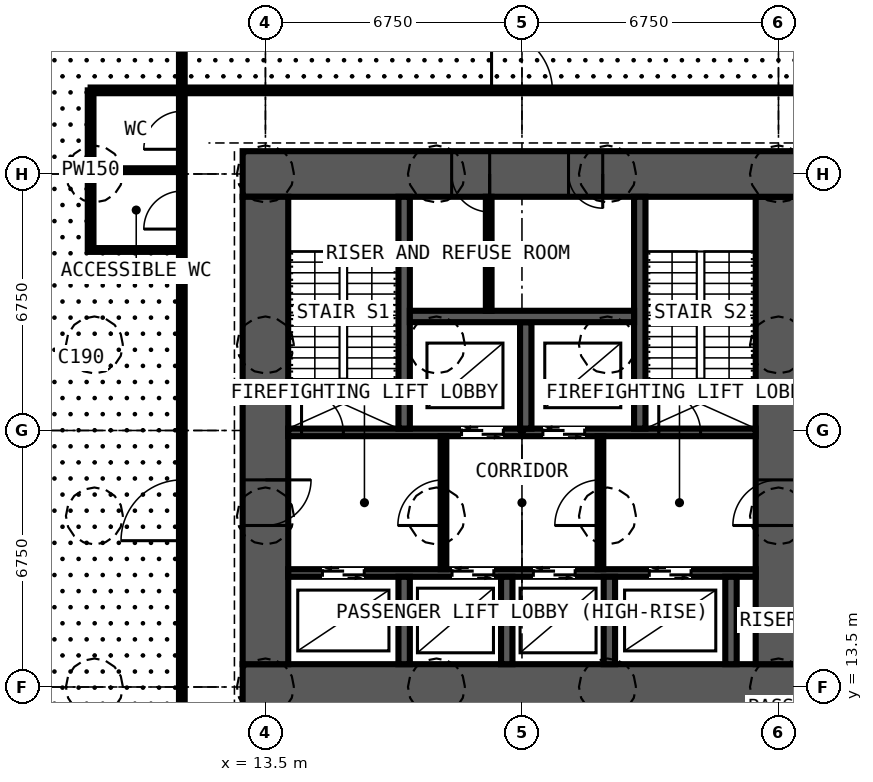
"""IFC4 building model, lengths in metres.
Left out: names, types, materials, properties, quantities, classifications, styles, units other than length and angle.
Written with IfcOpenShell. Run it as: python <this file> out.ifc"""

import sys

from ifc_helpers import new_model, si_unit, direction, frame, frame_2d, origin, place, context, subcontext, project, spatial, rectangle, extrude, element, fill, save


model = new_model("IFC4")
c1 = context("Model", 3, precision=1e-05, world=origin(), true_north=direction((0.0, 1.0)))
c2 = subcontext(c1, "Body", "Model", "MODEL_VIEW")
j1 = project(units=[si_unit("LENGTHUNIT", "METRE"), si_unit("PLANEANGLEUNIT", "RADIAN")], contexts=[c1])
p1 = place(None, origin())
s1 = spatial("IfcSite", under=j1, at=p1, CompositionType="ELEMENT")
p2 = place(p1, origin())
s2 = spatial("IfcBuilding", under=s1, at=p2, CompositionType="ELEMENT")
p3 = place(p2, origin())
s3 = spatial("IfcBuildingStorey", under=s2, at=p3, CompositionType="ELEMENT", Elevation=0.0)
p4 = place(p3, frame((12.9, 13.5, 0.0), z_axis=(0.0, 0.0, 1.0), x_axis=(1.0, 0.0, 0.0)))
e1 = element("IfcWall", 1, at=p4, inside=s3, PredefinedType="SHEAR", context=c2, shape_type="SweptSolid", body=[
    extrude(rectangle(XDim=14.7, YDim=1.2, at=frame_2d((7.35, 0.0))), origin(), (0.0, 0.0, 1.0), 4.5),
])
p5 = place(p3, frame((27.0, 14.1, 0.0), z_axis=(0.0, 0.0, 1.0), x_axis=(0.0, 1.0, 0.0)))
e2 = element("IfcWall", 2, at=p5, inside=s3, PredefinedType="SHEAR", context=c2, shape_type="SweptSolid", body=[
    extrude(rectangle(XDim=12.3, YDim=1.2, at=frame_2d((6.15, 0.0))), origin(), (0.0, 0.0, 1.0), 4.5),
])
p6 = place(p5, frame((3.65, 0.0, 0.0)))
e3 = element("IfcOpeningElement", 3, at=p6, cuts=e2, PredefinedType="OPENING", context=c2, shape_type="SweptSolid", body=[
    extrude(rectangle(XDim=1.2, YDim=2.2, at=frame_2d((0.6, 1.1))), frame((0.0, 0.61, 0.0), z_axis=(0.0, -1.0, 0.0), x_axis=(1.0, 0.0, 0.0)), (0.0, 0.0, 1.0), 1.22),
])
p7 = place(p3, frame((27.6, 27.0, 0.0), z_axis=(0.0, 0.0, 1.0), x_axis=(-1.0, 0.0, 0.0)))
e4 = element("IfcWall", 4, at=p7, inside=s3, PredefinedType="SHEAR", context=c2, shape_type="SweptSolid", body=[
    extrude(rectangle(XDim=14.7, YDim=1.2, at=frame_2d((7.35, 0.0))), origin(), (0.0, 0.0, 1.0), 4.5),
])
p8 = place(p7, frame((5.225, 0.0, 0.0)))
e5 = element("IfcOpeningElement", 5, at=p8, cuts=e4, PredefinedType="OPENING", context=c2, shape_type="SweptSolid", body=[
    extrude(rectangle(XDim=0.9, YDim=2.2, at=frame_2d((0.45, 1.1))), frame((0.0, 0.61, 0.0), z_axis=(0.0, -1.0, 0.0), x_axis=(1.0, 0.0, 0.0)), (0.0, 0.0, 1.0), 1.22),
])
p9 = place(p7, frame((8.2, 0.0, 0.0)))
e6 = element("IfcOpeningElement", 6, at=p9, cuts=e4, PredefinedType="OPENING", context=c2, shape_type="SweptSolid", body=[
    extrude(rectangle(XDim=1.0, YDim=2.2, at=frame_2d((0.5, 1.1))), frame((0.0, 0.61, 0.0), z_axis=(0.0, -1.0, 0.0), x_axis=(1.0, 0.0, 0.0)), (0.0, 0.0, 1.0), 1.22),
])
p10 = place(p3, frame((13.5, 26.4, 0.0), z_axis=(0.0, 0.0, 1.0), x_axis=(0.0, -1.0, 0.0)))
e7 = element("IfcWall", 7, at=p10, inside=s3, PredefinedType="SHEAR", context=c2, shape_type="SweptSolid", body=[
    extrude(rectangle(XDim=12.3, YDim=1.2, at=frame_2d((6.15, 0.0))), origin(), (0.0, 0.0, 1.0), 4.5),
])
p11 = place(p10, frame((7.45, 0.0, 0.0)))
e8 = element("IfcOpeningElement", 8, at=p11, cuts=e7, PredefinedType="OPENING", context=c2, shape_type="SweptSolid", body=[
    extrude(rectangle(XDim=1.2, YDim=2.2, at=frame_2d((0.6, 1.1))), frame((0.0, 0.61, 0.0), z_axis=(0.0, -1.0, 0.0), x_axis=(1.0, 0.0, 0.0)), (0.0, 0.0, 1.0), 1.22),
])
p12 = place(p3, frame((14.1, 16.5, 0.0), z_axis=(0.0, 0.0, 1.0), x_axis=(1.0, 0.0, 0.0)))
e9 = element("IfcWall", 9, at=p12, inside=s3, PredefinedType="SHEAR", context=c2, shape_type="SweptSolid", body=[
    extrude(rectangle(XDim=12.3, YDim=0.2, at=frame_2d((6.15, 0.0))), origin(), (0.0, 0.0, 1.0), 4.5),
])
p13 = place(p12, frame((0.9, 0.0, 0.0)))
e10 = element("IfcOpeningElement", 10, at=p13, cuts=e9, PredefinedType="OPENING", context=c2, shape_type="SweptSolid", body=[
    extrude(rectangle(XDim=1.1, YDim=2.2, at=frame_2d((0.55, 1.1))), frame((0.0, 0.11, 0.0), z_axis=(0.0, -1.0, 0.0), x_axis=(1.0, 0.0, 0.0)), (0.0, 0.0, 1.0), 0.22),
])
p14 = place(p12, frame((4.31, 0.0, 0.0)))
e11 = element("IfcOpeningElement", 11, at=p14, cuts=e9, PredefinedType="OPENING", context=c2, shape_type="SweptSolid", body=[
    extrude(rectangle(XDim=1.1, YDim=2.2, at=frame_2d((0.55, 1.1))), frame((0.0, 0.11, 0.0), z_axis=(0.0, -1.0, 0.0), x_axis=(1.0, 0.0, 0.0)), (0.0, 0.0, 1.0), 0.22),
])
p15 = place(p12, frame((6.45, 0.0, 0.0)))
e12 = element("IfcOpeningElement", 12, at=p15, cuts=e9, PredefinedType="OPENING", context=c2, shape_type="SweptSolid", body=[
    extrude(rectangle(XDim=1.1, YDim=2.2, at=frame_2d((0.55, 1.1))), frame((0.0, 0.11, 0.0), z_axis=(0.0, -1.0, 0.0), x_axis=(1.0, 0.0, 0.0)), (0.0, 0.0, 1.0), 0.22),
])
p16 = place(p12, frame((9.5, 0.0, 0.0)))
e13 = element("IfcOpeningElement", 13, at=p16, cuts=e9, PredefinedType="OPENING", context=c2, shape_type="SweptSolid", body=[
    extrude(rectangle(XDim=1.1, YDim=2.2, at=frame_2d((0.55, 1.1))), frame((0.0, 0.11, 0.0), z_axis=(0.0, -1.0, 0.0), x_axis=(1.0, 0.0, 0.0)), (0.0, 0.0, 1.0), 0.22),
])
p17 = place(p3, frame((14.1, 20.2, 0.0), z_axis=(0.0, 0.0, 1.0), x_axis=(1.0, 0.0, 0.0)))
e14 = element("IfcWall", 14, at=p17, inside=s3, PredefinedType="SHEAR", context=c2, shape_type="SweptSolid", body=[
    extrude(rectangle(XDim=12.3, YDim=0.2, at=frame_2d((6.15, 0.0))), origin(), (0.0, 0.0, 1.0), 4.5),
])
p18 = place(p17, frame((4.56, 0.0, 0.0)))
e15 = element("IfcOpeningElement", 15, at=p18, cuts=e14, PredefinedType="OPENING", context=c2, shape_type="SweptSolid", body=[
    extrude(rectangle(XDim=1.1, YDim=2.2, at=frame_2d((0.55, 1.1))), frame((0.0, 0.11, 0.0), z_axis=(0.0, -1.0, 0.0), x_axis=(1.0, 0.0, 0.0)), (0.0, 0.0, 1.0), 0.22),
])
p19 = place(p17, frame((6.7, 0.0, 0.0)))
e16 = element("IfcOpeningElement", 16, at=p19, cuts=e14, PredefinedType="OPENING", context=c2, shape_type="SweptSolid", body=[
    extrude(rectangle(XDim=1.1, YDim=2.2, at=frame_2d((0.55, 1.1))), frame((0.0, 0.11, 0.0), z_axis=(0.0, -1.0, 0.0), x_axis=(1.0, 0.0, 0.0)), (0.0, 0.0, 1.0), 0.22),
])
p20 = place(p17, frame((0.35, 0.0, 0.0)))
e17 = element("IfcOpeningElement", 17, at=p20, cuts=e14, PredefinedType="OPENING", context=c2, shape_type="SweptSolid", body=[
    extrude(rectangle(XDim=1.1, YDim=2.2, at=frame_2d((0.55, 1.1))), frame((0.0, 0.11, 0.0), z_axis=(0.0, -1.0, 0.0), x_axis=(1.0, 0.0, 0.0)), (0.0, 0.0, 1.0), 0.22),
])
p21 = place(p17, frame((9.75, 0.0, 0.0)))
e18 = element("IfcOpeningElement", 18, at=p21, cuts=e14, PredefinedType="OPENING", context=c2, shape_type="SweptSolid", body=[
    extrude(rectangle(XDim=1.1, YDim=2.2, at=frame_2d((0.55, 1.1))), frame((0.0, 0.11, 0.0), z_axis=(0.0, -1.0, 0.0), x_axis=(1.0, 0.0, 0.0)), (0.0, 0.0, 1.0), 0.22),
])
for number, where, z_axis, x_axis in (
    (19, (17.15, 20.3, 0.0), (0.0, 0.0, 1.0), (0.0, 1.0, 0.0)),
    (20, (23.35, 20.3, 0.0), (0.0, 0.0, 1.0), (0.0, 1.0, 0.0)),
):
    element("IfcWall", number, at=place(p3, frame(where, z_axis=z_axis, x_axis=x_axis)), inside=s3, PredefinedType="SHEAR", context=c2, shape_type="SweptSolid", body=[
        extrude(rectangle(XDim=6.1, YDim=0.3, at=frame_2d((3.05, 0.0))), origin(), (0.0, 0.0, 1.0), 4.5),
    ])
p22 = place(p3, frame((20.35, 20.3, 0.0), z_axis=(0.0, 0.0, 1.0), x_axis=(0.0, 1.0, 0.0)))
e21 = element("IfcWall", 21, at=p22, inside=s3, PredefinedType="SHEAR", context=c2, shape_type="SweptSolid", body=[
    extrude(rectangle(XDim=2.8, YDim=0.3, at=frame_2d((1.4, 0.0))), origin(), (0.0, 0.0, 1.0), 4.5),
])
p23 = place(p3, frame((17.3, 23.25, 0.0), z_axis=(0.0, 0.0, 1.0), x_axis=(1.0, 0.0, 0.0)))
e22 = element("IfcWall", 22, at=p23, inside=s3, PredefinedType="SHEAR", context=c2, shape_type="SweptSolid", body=[
    extrude(rectangle(XDim=5.9, YDim=0.3, at=frame_2d((2.95, 0.0))), origin(), (0.0, 0.0, 1.0), 4.5),
])
for number, where, z_axis, x_axis in (
    (23, (17.15, 14.1, 0.0), (0.0, 0.0, 1.0), (0.0, 1.0, 0.0)),
    (24, (19.85, 14.1, 0.0), (0.0, 0.0, 1.0), (0.0, 1.0, 0.0)),
    (25, (22.55, 14.1, 0.0), (0.0, 0.0, 1.0), (0.0, 1.0, 0.0)),
    (26, (25.75, 14.1, 0.0), (0.0, 0.0, 1.0), (0.0, 1.0, 0.0)),
):
    element("IfcWall", number, at=place(p3, frame(where, z_axis=z_axis, x_axis=x_axis)), inside=s3, PredefinedType="SHEAR", context=c2, shape_type="SweptSolid", body=[
        extrude(rectangle(XDim=2.3, YDim=0.3, at=frame_2d((1.15, 0.0))), origin(), (0.0, 0.0, 1.0), 4.5),
    ])
p24 = place(p3, frame((18.185, 16.6, 0.0), z_axis=(0.0, 0.0, 1.0), x_axis=(0.0, 1.0, 0.0)))
e27 = element("IfcWall", 27, at=p24, inside=s3, PredefinedType="PARTITIONING", context=c2, shape_type="SweptSolid", body=[
    extrude(rectangle(XDim=3.5, YDim=0.15, at=frame_2d((1.75, 0.0))), origin(), (0.0, 0.0, 1.0), 4.25),
])
p25 = place(p24, frame((1.15, 0.0, 0.0)))
e28 = element("IfcOpeningElement", 28, at=p25, cuts=e27, PredefinedType="OPENING", context=c2, shape_type="SweptSolid", body=[
    extrude(rectangle(XDim=1.2, YDim=2.2, at=frame_2d((0.6, 1.1))), frame((0.0, 0.085, 0.0), z_axis=(0.0, -1.0, 0.0), x_axis=(1.0, 0.0, 0.0)), (0.0, 0.0, 1.0), 0.17),
])
p26 = place(p3, frame((22.315, 16.6, 0.0), z_axis=(0.0, 0.0, 1.0), x_axis=(0.0, 1.0, 0.0)))
e29 = element("IfcWall", 29, at=p26, inside=s3, PredefinedType="PARTITIONING", context=c2, shape_type="SweptSolid", body=[
    extrude(rectangle(XDim=3.5, YDim=0.15, at=frame_2d((1.75, 0.0))), origin(), (0.0, 0.0, 1.0), 4.25),
])
p27 = place(p26, frame((1.15, 0.0, 0.0)))
e30 = element("IfcOpeningElement", 30, at=p27, cuts=e29, PredefinedType="OPENING", context=c2, shape_type="SweptSolid", body=[
    extrude(rectangle(XDim=1.2, YDim=2.2, at=frame_2d((0.6, 1.1))), frame((0.0, 0.085, 0.0), z_axis=(0.0, -1.0, 0.0), x_axis=(1.0, 0.0, 0.0)), (0.0, 0.0, 1.0), 0.17),
])
p28 = place(p3, frame((19.375, 23.4, 0.0), z_axis=(0.0, 0.0, 1.0), x_axis=(0.0, 1.0, 0.0)))
e31 = element("IfcWall", 31, at=p28, inside=s3, PredefinedType="PARTITIONING", context=c2, shape_type="SweptSolid", body=[
    extrude(rectangle(XDim=3.0, YDim=0.15, at=frame_2d((1.5, 0.0))), origin(), (0.0, 0.0, 1.0), 4.25),
])
p29 = place(p3, frame((8.9, 25.0, 0.0), z_axis=(0.0, 0.0, 1.0), x_axis=(0.0, 1.0, 0.0)))
e32 = element("IfcWall", 32, at=p29, inside=s3, PredefinedType="PARTITIONING", context=c2, shape_type="SweptSolid", body=[
    extrude(rectangle(XDim=4.2, YDim=0.15, at=frame_2d((2.1, 0.0))), origin(), (0.0, 0.0, 1.0), 4.25),
])
p30 = place(p3, frame((8.9, 25.0, 0.0), z_axis=(0.0, 0.0, 1.0), x_axis=(1.0, 0.0, 0.0)))
e33 = element("IfcWall", 33, at=p30, inside=s3, PredefinedType="PARTITIONING", context=c2, shape_type="SweptSolid", body=[
    extrude(rectangle(XDim=2.4, YDim=0.1, at=frame_2d((1.2, 0.0))), origin(), (0.0, 0.0, 1.0), 4.25),
])
p31 = place(p3, frame((8.9, 27.1, 0.0), z_axis=(0.0, 0.0, 1.0), x_axis=(1.0, 0.0, 0.0)))
e34 = element("IfcWall", 34, at=p31, inside=s3, PredefinedType="PARTITIONING", context=c2, shape_type="SweptSolid", body=[
    extrude(rectangle(XDim=2.4, YDim=0.1, at=frame_2d((1.2, 0.0))), origin(), (0.0, 0.0, 1.0), 3.752),
])
p32 = place(p3, frame((8.9, 29.2, 0.0), z_axis=(0.0, 0.0, 1.0), x_axis=(1.0, 0.0, 0.0)))
e35 = element("IfcWall", 35, at=p32, inside=s3, PredefinedType="PARTITIONING", context=c2, shape_type="SweptSolid", body=[
    extrude(rectangle(XDim=21.475, YDim=0.15, at=frame_2d((10.738, 0.0))), origin(), (0.0, 0.0, 1.0), 4.25),
])
p33 = place(p32, frame((10.55, 0.0, 0.0)))
e36 = element("IfcOpeningElement", 36, at=p33, cuts=e35, PredefinedType="OPENING", context=c2, shape_type="SweptSolid", body=[
    extrude(rectangle(XDim=1.6, YDim=2.4, at=frame_2d((0.8, 1.2))), frame((0.0, 0.085, 0.0), z_axis=(0.0, -1.0, 0.0), x_axis=(1.0, 0.0, 0.0)), (0.0, 0.0, 1.0), 0.17),
])
p34 = place(p3, frame((11.3, 11.3, 0.0), z_axis=(0.0, 0.0, 1.0), x_axis=(0.0, 1.0, 0.0)))
e37 = element("IfcWall", 37, at=p34, inside=s3, PredefinedType="PARTITIONING", context=c2, shape_type="SweptSolid", body=[
    extrude(rectangle(XDim=19.075, YDim=0.15, at=frame_2d((9.538, 0.0))), origin(), (0.0, 0.0, 1.0), 4.25),
])
p35 = place(p34, frame((14.25, 0.0, 0.0)))
e38 = element("IfcOpeningElement", 38, at=p35, cuts=e37, PredefinedType="OPENING", context=c2, shape_type="SweptSolid", body=[
    extrude(rectangle(XDim=1.0, YDim=2.2, at=frame_2d((0.5, 1.1))), frame((0.0, 0.085, 0.0), z_axis=(0.0, -1.0, 0.0), x_axis=(1.0, 0.0, 0.0)), (0.0, 0.0, 1.0), 0.17),
])
p36 = place(p34, frame((16.35, 0.0, 0.0)))
e39 = element("IfcOpeningElement", 39, at=p36, cuts=e37, PredefinedType="OPENING", context=c2, shape_type="SweptSolid", body=[
    extrude(rectangle(XDim=1.0, YDim=2.2, at=frame_2d((0.5, 1.1))), frame((0.0, 0.085, 0.0), z_axis=(0.0, -1.0, 0.0), x_axis=(1.0, 0.0, 0.0)), (0.0, 0.0, 1.0), 0.17),
])
p37 = place(p34, frame((6.05, 0.0, 0.0)))
e40 = element("IfcOpeningElement", 40, at=p37, cuts=e37, PredefinedType="OPENING", context=c2, shape_type="SweptSolid", body=[
    extrude(rectangle(XDim=1.6, YDim=2.4, at=frame_2d((0.8, 1.2))), frame((0.0, 0.085, 0.0), z_axis=(0.0, -1.0, 0.0), x_axis=(1.0, 0.0, 0.0)), (0.0, 0.0, 1.0), 0.17),
])
p38 = place(p13, origin())
e41 = element("IfcDoor", 41, at=p38, inside=s3, OperationType="DOUBLE_DOOR_SLIDING", PredefinedType="DOOR", context=c2, shape_type="SweptSolid", body=[
    extrude(rectangle(XDim=1.1, YDim=2.2, at=frame_2d((0.55, 1.1))), frame((0.0, 0.025, 0.0), z_axis=(0.0, -1.0, 0.0), x_axis=(1.0, 0.0, 0.0)), (0.0, 0.0, 1.0), 0.05),
])
fill(e10, e41)
p39 = place(p14, origin())
e42 = element("IfcDoor", 42, at=p39, inside=s3, OperationType="DOUBLE_DOOR_SLIDING", PredefinedType="DOOR", context=c2, shape_type="SweptSolid", body=[
    extrude(rectangle(XDim=1.1, YDim=2.2, at=frame_2d((0.55, 1.1))), frame((0.0, 0.025, 0.0), z_axis=(0.0, -1.0, 0.0), x_axis=(1.0, 0.0, 0.0)), (0.0, 0.0, 1.0), 0.05),
])
fill(e11, e42)
p40 = place(p15, origin())
e43 = element("IfcDoor", 43, at=p40, inside=s3, OperationType="DOUBLE_DOOR_SLIDING", PredefinedType="DOOR", context=c2, shape_type="SweptSolid", body=[
    extrude(rectangle(XDim=1.1, YDim=2.2, at=frame_2d((0.55, 1.1))), frame((0.0, 0.025, 0.0), z_axis=(0.0, -1.0, 0.0), x_axis=(1.0, 0.0, 0.0)), (0.0, 0.0, 1.0), 0.05),
])
fill(e12, e43)
p41 = place(p16, origin())
e44 = element("IfcDoor", 44, at=p41, inside=s3, OperationType="DOUBLE_DOOR_SLIDING", PredefinedType="DOOR", context=c2, shape_type="SweptSolid", body=[
    extrude(rectangle(XDim=1.1, YDim=2.2, at=frame_2d((0.55, 1.1))), frame((0.0, 0.025, 0.0), z_axis=(0.0, -1.0, 0.0), x_axis=(1.0, 0.0, 0.0)), (0.0, 0.0, 1.0), 0.05),
])
fill(e13, e44)
p42 = place(p18, origin())
e45 = element("IfcDoor", 45, at=p42, inside=s3, OperationType="DOUBLE_DOOR_SLIDING", PredefinedType="DOOR", context=c2, shape_type="SweptSolid", body=[
    extrude(rectangle(XDim=1.1, YDim=2.2, at=frame_2d((0.55, 1.1))), frame((0.0, 0.025, 0.0), z_axis=(0.0, -1.0, 0.0), x_axis=(1.0, 0.0, 0.0)), (0.0, 0.0, 1.0), 0.05),
])
fill(e15, e45)
p43 = place(p19, origin())
e46 = element("IfcDoor", 46, at=p43, inside=s3, OperationType="DOUBLE_DOOR_SLIDING", PredefinedType="DOOR", context=c2, shape_type="SweptSolid", body=[
    extrude(rectangle(XDim=1.1, YDim=2.2, at=frame_2d((0.55, 1.1))), frame((0.0, 0.025, 0.0), z_axis=(0.0, -1.0, 0.0), x_axis=(1.0, 0.0, 0.0)), (0.0, 0.0, 1.0), 0.05),
])
fill(e16, e46)
p44 = place(p11, origin())
e47 = element("IfcDoor", 47, at=p44, inside=s3, OperationType="DOUBLE_DOOR_SINGLE_SWING", PredefinedType="DOOR", context=c2, shape_type="SweptSolid", body=[
    extrude(rectangle(XDim=1.2, YDim=2.2, at=frame_2d((0.6, 1.1))), frame((0.0, 0.025, 0.0), z_axis=(0.0, -1.0, 0.0), x_axis=(1.0, 0.0, 0.0)), (0.0, 0.0, 1.0), 0.05),
])
fill(e8, e47)
p45 = place(p6, origin())
e48 = element("IfcDoor", 48, at=p45, inside=s3, OperationType="DOUBLE_DOOR_SINGLE_SWING", PredefinedType="DOOR", context=c2, shape_type="SweptSolid", body=[
    extrude(rectangle(XDim=1.2, YDim=2.2, at=frame_2d((0.6, 1.1))), frame((0.0, 0.025, 0.0), z_axis=(0.0, -1.0, 0.0), x_axis=(1.0, 0.0, 0.0)), (0.0, 0.0, 1.0), 0.05),
])
fill(e3, e48)
p46 = place(p25, origin())
e49 = element("IfcDoor", 49, at=p46, inside=s3, OperationType="DOUBLE_DOOR_SINGLE_SWING", PredefinedType="DOOR", context=c2, shape_type="SweptSolid", body=[
    extrude(rectangle(XDim=1.2, YDim=2.2, at=frame_2d((0.6, 1.1))), frame((0.0, 0.025, 0.0), z_axis=(0.0, -1.0, 0.0), x_axis=(1.0, 0.0, 0.0)), (0.0, 0.0, 1.0), 0.05),
])
fill(e28, e49)
p47 = place(p27, origin())
e50 = element("IfcDoor", 50, at=p47, inside=s3, OperationType="DOUBLE_DOOR_SINGLE_SWING", PredefinedType="DOOR", context=c2, shape_type="SweptSolid", body=[
    extrude(rectangle(XDim=1.2, YDim=2.2, at=frame_2d((0.6, 1.1))), frame((0.0, 0.025, 0.0), z_axis=(0.0, -1.0, 0.0), x_axis=(1.0, 0.0, 0.0)), (0.0, 0.0, 1.0), 0.05),
])
fill(e30, e50)
p48 = place(p8, origin())
e51 = element("IfcDoor", 51, at=p48, inside=s3, OperationType="SINGLE_SWING_LEFT", PredefinedType="DOOR", context=c2, shape_type="SweptSolid", body=[
    extrude(rectangle(XDim=0.9, YDim=2.2, at=frame_2d((0.45, 1.1))), frame((0.0, 0.4, 0.0), z_axis=(0.0, -1.0, 0.0), x_axis=(1.0, 0.0, 0.0)), (0.0, 0.0, 1.0), 0.8),
])
fill(e5, e51)
p49 = place(p9, origin())
e52 = element("IfcDoor", 52, at=p49, inside=s3, OperationType="SINGLE_SWING_LEFT", PredefinedType="DOOR", context=c2, shape_type="SweptSolid", body=[
    extrude(rectangle(XDim=1.0, YDim=2.2, at=frame_2d((0.5, 1.1))), frame((0.0, 0.025, 0.0), z_axis=(0.0, -1.0, 0.0), x_axis=(1.0, 0.0, 0.0)), (0.0, 0.0, 1.0), 0.05),
])
fill(e6, e52)
p50 = place(p20, origin())
e53 = element("IfcDoor", 53, at=p50, inside=s3, OperationType="SINGLE_SWING_LEFT", PredefinedType="DOOR", context=c2, shape_type="SweptSolid", body=[
    extrude(rectangle(XDim=1.1, YDim=2.2, at=frame_2d((0.55, 1.1))), frame((0.0, 0.025, 0.0), z_axis=(0.0, -1.0, 0.0), x_axis=(1.0, 0.0, 0.0)), (0.0, 0.0, 1.0), 0.05),
])
fill(e17, e53)
p51 = place(p21, origin())
e54 = element("IfcDoor", 54, at=p51, inside=s3, OperationType="SINGLE_SWING_LEFT", PredefinedType="DOOR", context=c2, shape_type="SweptSolid", body=[
    extrude(rectangle(XDim=1.1, YDim=2.2, at=frame_2d((0.55, 1.1))), frame((0.0, 0.025, 0.0), z_axis=(0.0, -1.0, 0.0), x_axis=(1.0, 0.0, 0.0)), (0.0, 0.0, 1.0), 0.05),
])
fill(e18, e54)
p52 = place(p33, origin())
e55 = element("IfcDoor", 55, at=p52, inside=s3, OperationType="DOUBLE_DOOR_SINGLE_SWING", PredefinedType="DOOR", context=c2, shape_type="SweptSolid", body=[
    extrude(rectangle(XDim=1.6, YDim=2.4, at=frame_2d((0.8, 1.2))), frame((0.0, 0.025, 0.0), z_axis=(0.0, -1.0, 0.0), x_axis=(1.0, 0.0, 0.0)), (0.0, 0.0, 1.0), 0.05),
])
fill(e36, e55)
p53 = place(p35, origin())
e56 = element("IfcDoor", 56, at=p53, inside=s3, OperationType="SINGLE_SWING_LEFT", PredefinedType="DOOR", context=c2, shape_type="SweptSolid", body=[
    extrude(rectangle(XDim=1.0, YDim=2.2, at=frame_2d((0.5, 1.1))), frame((0.0, 0.025, 0.0), z_axis=(0.0, -1.0, 0.0), x_axis=(1.0, 0.0, 0.0)), (0.0, 0.0, 1.0), 0.05),
])
fill(e38, e56)
p54 = place(p36, origin())
e57 = element("IfcDoor", 57, at=p54, inside=s3, OperationType="SINGLE_SWING_LEFT", PredefinedType="DOOR", context=c2, shape_type="SweptSolid", body=[
    extrude(rectangle(XDim=1.0, YDim=2.2, at=frame_2d((0.5, 1.1))), frame((0.0, 0.025, 0.0), z_axis=(0.0, -1.0, 0.0), x_axis=(1.0, 0.0, 0.0)), (0.0, 0.0, 1.0), 0.05),
])
fill(e39, e57)
p55 = place(p37, origin())
e58 = element("IfcDoor", 58, at=p55, inside=s3, OperationType="DOUBLE_DOOR_SINGLE_SWING", PredefinedType="DOOR", context=c2, shape_type="SweptSolid", body=[
    extrude(rectangle(XDim=1.6, YDim=2.4, at=frame_2d((0.8, 1.2))), frame((0.0, 0.025, 0.0), z_axis=(0.0, -1.0, 0.0), x_axis=(1.0, 0.0, 0.0)), (0.0, 0.0, 1.0), 0.05),
])
fill(e40, e58)
save(model, sys.argv[1])
